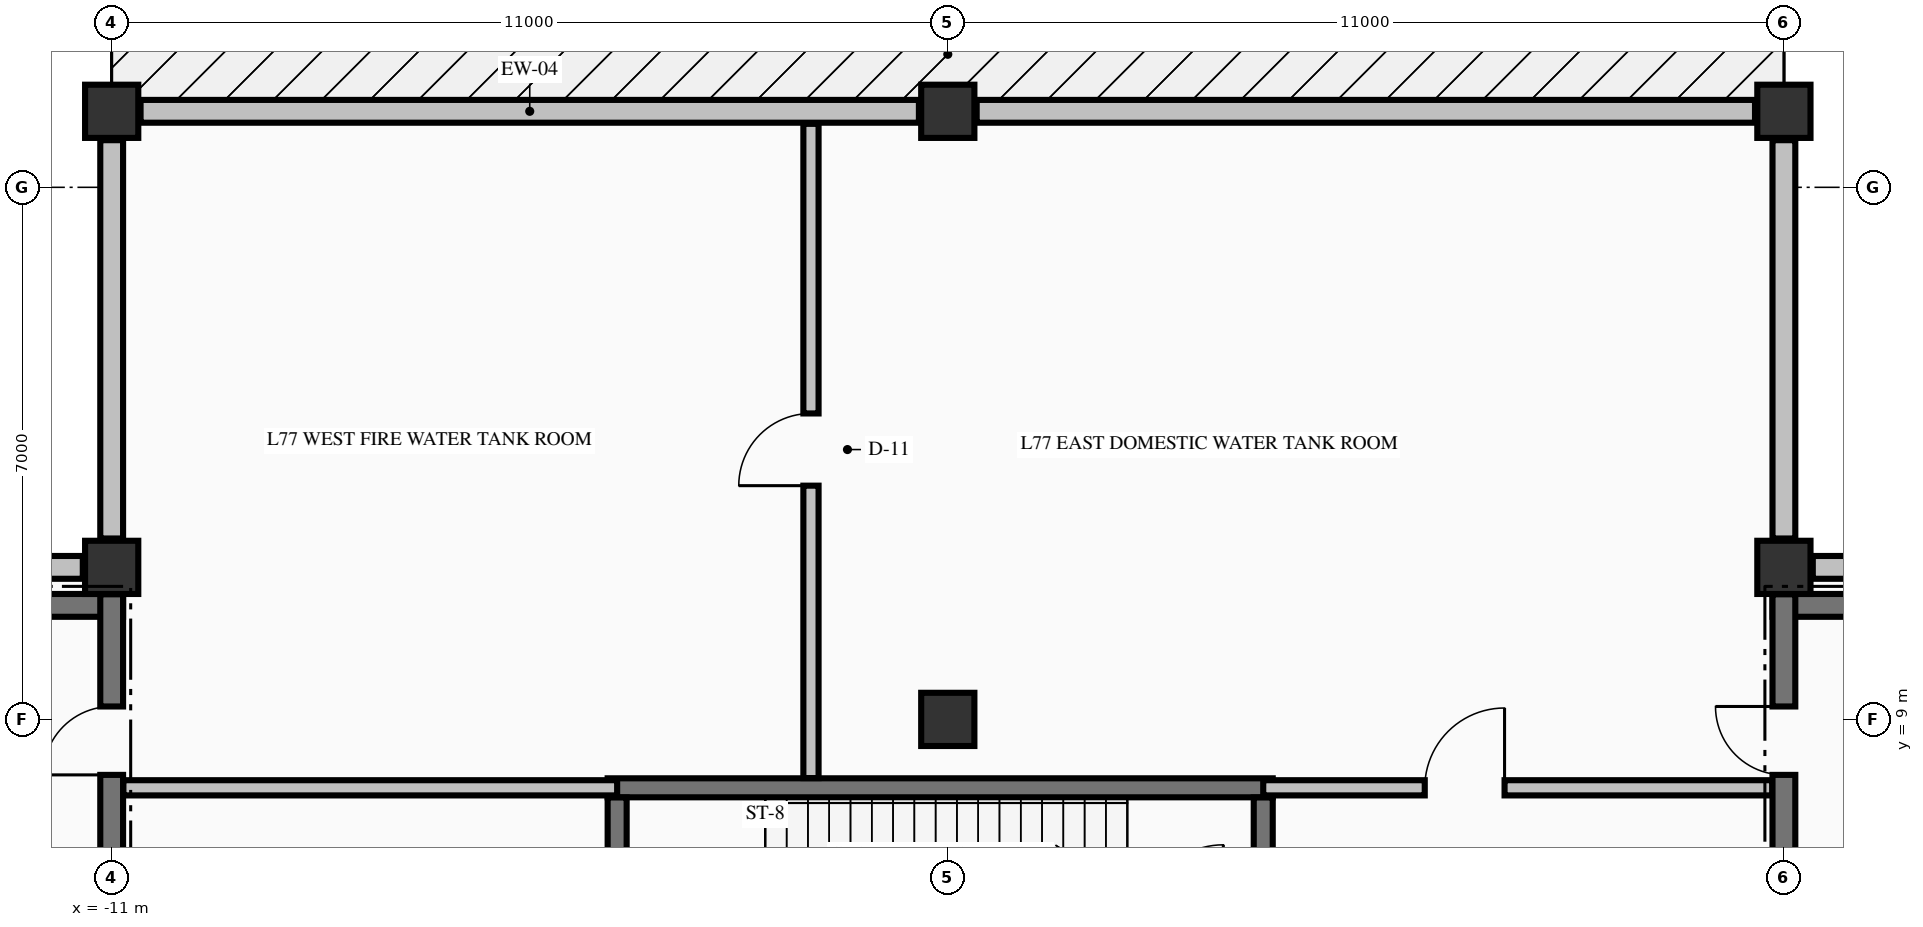
"""IFC4 building model, lengths in metres.
Left out: names, types, materials, properties, quantities, classifications, styles, units other than length and angle.
Written with IfcOpenShell. Run it as: python <this file> out.ifc"""

import sys

from ifc_helpers import new_model, si_unit, direction, frame, frame_2d, origin, origin_2d, place, context, subcontext, project, spatial, rectangle, extrude, element, fill, save


model = new_model("IFC4")
c1 = context("Model", 3, precision=1e-05, world=origin(), true_north=direction((0.0, 1.0)))
c2 = subcontext(c1, "Body", "Model", "MODEL_VIEW")
j1 = project(units=[si_unit("LENGTHUNIT", "METRE"), si_unit("PLANEANGLEUNIT", "RADIAN")], contexts=[c1])
p1 = place(None, origin())
s1 = spatial("IfcSite", under=j1, at=p1, CompositionType="ELEMENT")
p2 = place(p1, origin())
s2 = spatial("IfcBuilding", under=s1, at=p2, CompositionType="ELEMENT")
p3 = place(p2, frame((0.0, 0.0, 287.92)))
s3 = spatial("IfcBuildingStorey", under=s2, at=p3, CompositionType="ELEMENT", Elevation=287.92)
for number, where, z_axis, x_axis in (
    (1, (11.0, 17.0, -0.325), (0.0, 0.0, 1.0), (1.0, 0.0, 0.0)),
    (2, (0.0, 17.0, -0.325), (0.0, 0.0, 1.0), (1.0, 0.0, 0.0)),
    (3, (-11.0, 17.0, -0.325), (0.0, 0.0, 1.0), (1.0, 0.0, 0.0)),
    (4, (-11.0, 11.0, -0.325), (0.0, 0.0, 1.0), (1.0, 0.0, 0.0)),
    (5, (11.0, 11.0, -0.325), (0.0, 0.0, 1.0), (1.0, 0.0, 0.0)),
    (6, (0.0, 9.0, -0.325), (0.0, 0.0, 1.0), (1.0, 0.0, 0.0)),
):
    element("IfcColumn", number, at=place(p3, frame(where, z_axis=z_axis, x_axis=x_axis)), inside=s3, PredefinedType="COLUMN", context=c2, shape_type="SweptSolid", body=[
        extrude(rectangle(XDim=0.7, YDim=0.7, at=origin_2d()), origin(), (0.0, 0.0, 1.0), 3.06),
    ])
for number, where, z_axis, x_axis in (
    (7, (-0.38, 17.0, 0.0), (0.0, 0.0, 1.0), (-1.0, 0.0, 0.0)),
    (8, (10.62, 17.0, 0.0), (0.0, 0.0, 1.0), (-1.0, 0.0, 0.0)),
):
    element("IfcWall", number, at=place(p3, frame(where, z_axis=z_axis, x_axis=x_axis)), inside=s3, PredefinedType="STANDARD", context=c2, shape_type="SweptSolid", body=[
        extrude(rectangle(XDim=10.24, YDim=0.3, at=frame_2d((5.12, 0.0))), origin(), (0.0, 0.0, 1.0), 2.127),
    ])
p4 = place(p3, frame((16.62, 11.0, 0.0), z_axis=(0.0, 0.0, 1.0), x_axis=(-1.0, 0.0, 0.0)))
e9 = element("IfcWall", 9, at=p4, inside=s3, PredefinedType="STANDARD", context=c2, shape_type="SweptSolid", body=[
    extrude(rectangle(XDim=5.24, YDim=0.3, at=frame_2d((2.62, 0.0))), origin(), (0.0, 0.0, 1.0), 1.077),
])
for number, where, z_axis, x_axis in (
    (10, (11.0, 11.38, 0.0), (0.0, 0.0, 1.0), (0.0, 1.0, 0.0)),
    (11, (-11.0, 16.62, 0.0), (0.0, 0.0, 1.0), (0.0, -1.0, 0.0)),
):
    element("IfcWall", number, at=place(p3, frame(where, z_axis=z_axis, x_axis=x_axis)), inside=s3, PredefinedType="STANDARD", context=c2, shape_type="SweptSolid", body=[
        extrude(rectangle(XDim=5.24, YDim=0.3, at=frame_2d((2.62, 0.0))), origin(), (0.0, 0.0, 1.0), 0.927),
    ])
p5 = place(p3, frame((-11.38, 11.0, 0.0), z_axis=(0.0, 0.0, 1.0), x_axis=(-1.0, 0.0, 0.0)))
e12 = element("IfcWall", 12, at=p5, inside=s3, PredefinedType="STANDARD", context=c2, shape_type="SweptSolid", body=[
    extrude(rectangle(XDim=5.24, YDim=0.3, at=frame_2d((2.62, 0.0))), origin(), (0.0, 0.0, 1.0), 1.077),
])
p6 = place(p3, frame((-4.475, 8.1, 0.0), z_axis=(0.0, 0.0, 1.0), x_axis=(1.0, 0.0, 0.0)))
e13 = element("IfcWall", 13, at=p6, inside=s3, PredefinedType="SOLIDWALL", context=c2, shape_type="SweptSolid", body=[
    extrude(rectangle(XDim=8.75, YDim=0.25, at=frame_2d((4.375, 0.0))), origin(), (0.0, 0.0, 1.0), 2.735),
])
for number, where, z_axis, x_axis in (
    (14, (-14.85, 10.5, 0.0), (0.0, 0.0, 1.0), (1.0, 0.0, 0.0)),
    (15, (10.85, 10.5, 0.0), (0.0, 0.0, 1.0), (1.0, 0.0, 0.0)),
):
    element("IfcWall", number, at=place(p3, frame(where, z_axis=z_axis, x_axis=x_axis)), inside=s3, PredefinedType="SHEAR", context=c2, shape_type="SweptSolid", body=[
        extrude(rectangle(XDim=4.0, YDim=0.3, at=frame_2d((2.0, 0.0))), origin(), (0.0, 0.0, 1.0), 2.735),
    ])
p7 = place(p3, frame((-10.847, 8.1, 0.0), z_axis=(0.0, 0.0, 1.0), x_axis=(1.0, 0.0, 0.0)))
e16 = element("IfcWall", 16, at=p7, inside=s3, PredefinedType="PARTITIONING", context=c2, shape_type="SweptSolid", body=[
    extrude(rectangle(XDim=6.497, YDim=0.2, at=frame_2d((3.249, 0.0))), origin(), (0.0, 0.0, 1.0), 2.735),
])
p8 = place(p3, frame((4.15, 8.1, 0.0), z_axis=(0.0, 0.0, 1.0), x_axis=(1.0, 0.0, 0.0)))
e17 = element("IfcWall", 17, at=p8, inside=s3, PredefinedType="PARTITIONING", context=c2, shape_type="SweptSolid", body=[
    extrude(rectangle(XDim=6.697, YDim=0.2, at=frame_2d((3.349, 0.0))), origin(), (0.0, 0.0, 1.0), 2.735),
])
p9 = place(p8, frame((2.125, 0.0, 0.0)))
e18 = element("IfcOpeningElement", 18, at=p9, cuts=e17, PredefinedType="OPENING", context=c2, shape_type="SweptSolid", body=[
    extrude(rectangle(XDim=1.05, YDim=2.15, at=frame_2d((0.525, 1.075))), frame((0.0, 0.11, 0.0), z_axis=(0.0, -1.0, 0.0), x_axis=(1.0, 0.0, 0.0)), (0.0, 0.0, 1.0), 0.22),
])
p10 = place(p3, frame((-11.0, 5.852, 0.0), z_axis=(0.0, 0.0, 1.0), x_axis=(0.0, 1.0, 0.0)))
e19 = element("IfcWall", 19, at=p10, inside=s3, PredefinedType="SHEAR", context=c2, shape_type="SweptSolid", body=[
    extrude(rectangle(XDim=4.794, YDim=0.3, at=frame_2d((2.397, 0.0))), origin(), (0.0, 0.0, 1.0), 2.735),
])
p11 = place(p10, frame((2.418, 0.0, 0.0)))
e20 = element("IfcOpeningElement", 20, at=p11, cuts=e19, PredefinedType="OPENING", context=c2, shape_type="SweptSolid", body=[
    extrude(rectangle(XDim=0.9, YDim=2.15, at=frame_2d((0.45, 1.075))), frame((0.0, 0.16, 0.0), z_axis=(0.0, -1.0, 0.0), x_axis=(1.0, 0.0, 0.0)), (0.0, 0.0, 1.0), 0.32),
])
for number, where, z_axis, x_axis in (
    (21, (-4.35, 6.427, 0.0), (0.0, 0.0, 1.0), (0.0, 1.0, 0.0)),
    (22, (4.15, 6.427, 0.0), (0.0, 0.0, 1.0), (0.0, 1.0, 0.0)),
):
    element("IfcWall", number, at=place(p3, frame(where, z_axis=z_axis, x_axis=x_axis)), inside=s3, PredefinedType="SOLIDWALL", context=c2, shape_type="SweptSolid", body=[
        extrude(rectangle(XDim=1.546, YDim=0.25, at=frame_2d((0.773, 0.0))), origin(), (0.0, 0.0, 1.0), 2.735),
    ])
p12 = place(p3, frame((11.0, 5.852, 0.0), z_axis=(0.0, 0.0, 1.0), x_axis=(0.0, 1.0, 0.0)))
e23 = element("IfcWall", 23, at=p12, inside=s3, PredefinedType="SHEAR", context=c2, shape_type="SweptSolid", body=[
    extrude(rectangle(XDim=4.794, YDim=0.3, at=frame_2d((2.397, 0.0))), origin(), (0.0, 0.0, 1.0), 2.735),
])
p13 = place(p12, frame((2.418, 0.0, 0.0)))
e24 = element("IfcOpeningElement", 24, at=p13, cuts=e23, PredefinedType="OPENING", context=c2, shape_type="SweptSolid", body=[
    extrude(rectangle(XDim=0.9, YDim=2.15, at=frame_2d((0.45, 1.075))), frame((0.0, 0.16, 0.0), z_axis=(0.0, -1.0, 0.0), x_axis=(1.0, 0.0, 0.0)), (0.0, 0.0, 1.0), 0.32),
])
p14 = place(p3, frame((-1.8, 8.228, 0.0), z_axis=(0.0, 0.0, 1.0), x_axis=(0.0, 1.0, 0.0)))
e25 = element("IfcWall", 25, at=p14, inside=s3, PredefinedType="PARTITIONING", context=c2, shape_type="SweptSolid", body=[
    extrude(rectangle(XDim=8.607, YDim=0.2, at=frame_2d((4.303, 0.0))), origin(), (0.0, 0.0, 1.0), 2.735),
])
p15 = place(p14, frame((3.847, 0.0, 0.0)))
e26 = element("IfcOpeningElement", 26, at=p15, cuts=e25, PredefinedType="OPENING", context=c2, shape_type="SweptSolid", body=[
    extrude(rectangle(XDim=0.95, YDim=2.15, at=frame_2d((0.475, 1.075))), frame((0.0, 0.11, 0.0), z_axis=(0.0, -1.0, 0.0), x_axis=(1.0, 0.0, 0.0)), (0.0, 0.0, 1.0), 0.22),
])
p16 = place(p11, origin())
e27 = element("IfcDoor", 27, at=p16, inside=s3, OperationType="SINGLE_SWING_LEFT", PredefinedType="DOOR", context=c2, shape_type="SweptSolid", body=[
    extrude(rectangle(XDim=0.9, YDim=2.15, at=frame_2d((0.45, 1.075))), frame((0.0, 0.025, 0.0), z_axis=(0.0, -1.0, 0.0), x_axis=(1.0, 0.0, 0.0)), (0.0, 0.0, 1.0), 0.05),
])
fill(e20, e27)
p17 = place(p13, origin())
e28 = element("IfcDoor", 28, at=p17, inside=s3, OperationType="SINGLE_SWING_RIGHT", PredefinedType="DOOR", context=c2, shape_type="SweptSolid", body=[
    extrude(rectangle(XDim=0.9, YDim=2.15, at=frame_2d((0.45, 1.075))), frame((0.0, 0.025, 0.0), z_axis=(0.0, -1.0, 0.0), x_axis=(1.0, 0.0, 0.0)), (0.0, 0.0, 1.0), 0.05),
])
fill(e24, e28)
p18 = place(p9, origin())
e29 = element("IfcDoor", 29, at=p18, inside=s3, OperationType="SINGLE_SWING_RIGHT", PredefinedType="DOOR", context=c2, shape_type="SweptSolid", body=[
    extrude(rectangle(XDim=1.05, YDim=2.15, at=frame_2d((0.525, 1.075))), frame((0.0, 0.025, 0.0), z_axis=(0.0, -1.0, 0.0), x_axis=(1.0, 0.0, 0.0)), (0.0, 0.0, 1.0), 0.05),
])
fill(e18, e29)
p19 = place(p15, origin())
e30 = element("IfcDoor", 30, at=p19, inside=s3, OperationType="SINGLE_SWING_LEFT", PredefinedType="DOOR", context=c2, shape_type="SweptSolid", body=[
    extrude(rectangle(XDim=0.95, YDim=2.15, at=frame_2d((0.475, 1.075))), frame((0.0, 0.025, 0.0), z_axis=(0.0, -1.0, 0.0), x_axis=(1.0, 0.0, 0.0)), (0.0, 0.0, 1.0), 0.05),
])
fill(e26, e30)
save(model, sys.argv[1])
